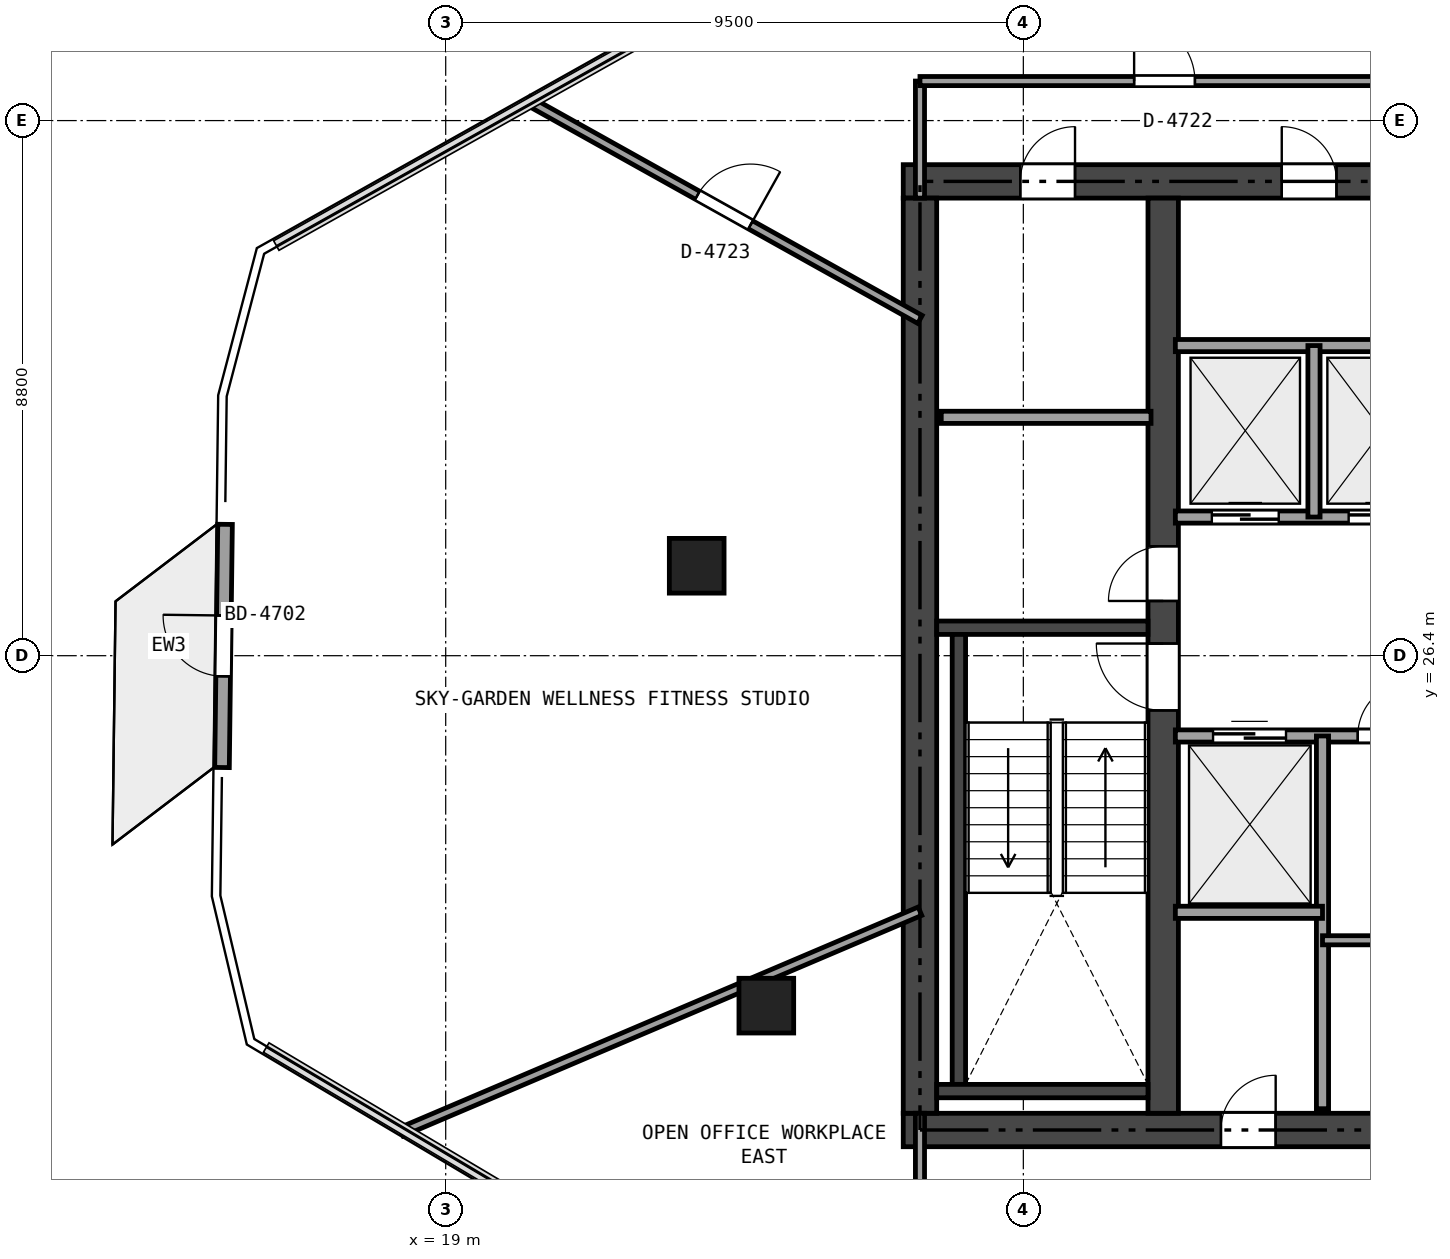
"""IFC4 building model, lengths in metres.
Left out: names, types, materials, properties, quantities, classifications, styles, units other than length and angle.
Written with IfcOpenShell. Run it as: python <this file> out.ifc"""

import sys

from ifc_helpers import new_model, si_unit, direction, frame, frame_2d, origin, origin_2d, place, context, subcontext, project, spatial, rectangle, extrude, element, fill, save


model = new_model("IFC4")
c1 = context("Model", 3, precision=1e-05, world=origin(), true_north=direction((0.0, 1.0)))
c2 = subcontext(c1, "Body", "Model", "MODEL_VIEW")
j1 = project(units=[si_unit("LENGTHUNIT", "METRE"), si_unit("PLANEANGLEUNIT", "RADIAN")], contexts=[c1])
p1 = place(None, origin())
s1 = spatial("IfcSite", under=j1, at=p1, CompositionType="ELEMENT")
p2 = place(p1, origin())
s2 = spatial("IfcBuilding", under=s1, at=p2, CompositionType="ELEMENT")
p3 = place(p2, frame((0.0, 0.0, 177.0)))
s3 = spatial("IfcBuildingStorey", under=s2, at=p3, CompositionType="ELEMENT", Elevation=177.0)
p4 = place(p3, frame((26.525, 18.6, 0.0), z_axis=(0.0, 0.0, 1.0), x_axis=(1.0, 0.0, 0.0)))
e1 = element("IfcWall", 1, at=p4, inside=s3, PredefinedType="SHEAR", context=c2, shape_type="SweptSolid", body=[
    extrude(rectangle(XDim=21.35, YDim=0.55, at=frame_2d((10.675, 0.0))), origin(), (0.0, 0.0, 1.0), 3.32),
])
p5 = place(p4, frame((12.4, 0.0, 0.0)))
e2 = element("IfcOpeningElement", 2, at=p5, cuts=e1, PredefinedType="OPENING", context=c2, shape_type="SweptSolid", body=[
    extrude(rectangle(XDim=1.15, YDim=2.15, at=frame_2d((0.575, 1.075))), frame((0.0, 0.285, 0.0), z_axis=(0.0, -1.0, 0.0), x_axis=(1.0, 0.0, 0.0)), (0.0, 0.0, 1.0), 0.57),
])
p6 = place(p4, frame((5.225, 0.0, 0.0)))
e3 = element("IfcOpeningElement", 3, at=p6, cuts=e1, PredefinedType="OPENING", context=c2, shape_type="SweptSolid", body=[
    extrude(rectangle(XDim=0.9, YDim=2.1, at=frame_2d((0.45, 1.05))), frame((0.0, 0.285, 0.0), z_axis=(0.0, -1.0, 0.0), x_axis=(1.0, 0.0, 0.0)), (0.0, 0.0, 1.0), 0.57),
])
p7 = place(p3, frame((26.525, 34.2, 0.0), z_axis=(0.0, 0.0, 1.0), x_axis=(1.0, 0.0, 0.0)))
e4 = element("IfcWall", 4, at=p7, inside=s3, PredefinedType="SHEAR", context=c2, shape_type="SweptSolid", body=[
    extrude(rectangle(XDim=21.35, YDim=0.55, at=frame_2d((10.675, 0.0))), origin(), (0.0, 0.0, 1.0), 3.32),
])
p8 = place(p7, frame((9.675, 0.0, 0.0)))
e5 = element("IfcOpeningElement", 5, at=p8, cuts=e4, PredefinedType="OPENING", context=c2, shape_type="SweptSolid", body=[
    extrude(rectangle(XDim=1.1, YDim=2.15, at=frame_2d((0.55, 1.075))), frame((0.0, 0.285, 0.0), z_axis=(0.0, -1.0, 0.0), x_axis=(1.0, 0.0, 0.0)), (0.0, 0.0, 1.0), 0.57),
])
p9 = place(p7, frame((1.925, 0.0, 0.0)))
e6 = element("IfcOpeningElement", 6, at=p9, cuts=e4, PredefinedType="OPENING", context=c2, shape_type="SweptSolid", body=[
    extrude(rectangle(XDim=0.9, YDim=2.1, at=frame_2d((0.45, 1.05))), frame((0.0, 0.285, 0.0), z_axis=(0.0, -1.0, 0.0), x_axis=(1.0, 0.0, 0.0)), (0.0, 0.0, 1.0), 0.57),
])
p10 = place(p7, frame((6.225, 0.0, 0.0)))
e7 = element("IfcOpeningElement", 7, at=p10, cuts=e4, PredefinedType="OPENING", context=c2, shape_type="SweptSolid", body=[
    extrude(rectangle(XDim=0.9, YDim=2.1, at=frame_2d((0.45, 1.05))), frame((0.0, 0.285, 0.0), z_axis=(0.0, -1.0, 0.0), x_axis=(1.0, 0.0, 0.0)), (0.0, 0.0, 1.0), 0.57),
])
p11 = place(p3, frame((26.8, 18.875, 0.0), z_axis=(0.0, 0.0, 1.0), x_axis=(0.0, 1.0, 0.0)))
e8 = element("IfcWall", 8, at=p11, inside=s3, PredefinedType="SHEAR", context=c2, shape_type="SweptSolid", body=[
    extrude(rectangle(XDim=15.05, YDim=0.55, at=frame_2d((7.525, 0.0))), origin(), (0.0, 0.0, 1.0), 3.32),
])
p12 = place(p3, frame((30.8, 18.875, 0.0), z_axis=(0.0, 0.0, 1.0), x_axis=(0.0, 1.0, 0.0)))
e9 = element("IfcWall", 9, at=p12, inside=s3, PredefinedType="SHEAR", context=c2, shape_type="SweptSolid", body=[
    extrude(rectangle(XDim=15.05, YDim=0.5, at=frame_2d((7.525, 0.0))), origin(), (0.0, 0.0, 1.0), 3.32),
])
p13 = place(p12, frame((6.625, 0.0, 0.0)))
e10 = element("IfcOpeningElement", 10, at=p13, cuts=e9, PredefinedType="OPENING", context=c2, shape_type="SweptSolid", body=[
    extrude(rectangle(XDim=1.1, YDim=2.15, at=frame_2d((0.55, 1.075))), frame((0.0, 0.26, 0.0), z_axis=(0.0, -1.0, 0.0), x_axis=(1.0, 0.0, 0.0)), (0.0, 0.0, 1.0), 0.52),
])
p14 = place(p12, frame((8.425, 0.0, 0.0)))
e11 = element("IfcOpeningElement", 11, at=p14, cuts=e9, PredefinedType="OPENING", context=c2, shape_type="SweptSolid", body=[
    extrude(rectangle(XDim=0.9, YDim=2.1, at=frame_2d((0.45, 1.05))), frame((0.0, 0.26, 0.0), z_axis=(0.0, -1.0, 0.0), x_axis=(1.0, 0.0, 0.0)), (0.0, 0.0, 1.0), 0.52),
])
p15 = place(p3, frame((27.075, 26.86, 0.0), z_axis=(0.0, 0.0, 1.0), x_axis=(1.0, 0.0, 0.0)))
e12 = element("IfcWall", 12, at=p15, inside=s3, PredefinedType="SHEAR", context=c2, shape_type="SweptSolid", body=[
    extrude(rectangle(XDim=3.475, YDim=0.22, at=frame_2d((1.738, 0.0))), origin(), (0.0, 0.0, 1.0), 3.32),
])
p16 = place(p3, frame((27.44, 19.35, 0.0), z_axis=(0.0, 0.0, 1.0), x_axis=(0.0, 1.0, 0.0)))
e13 = element("IfcWall", 13, at=p16, inside=s3, PredefinedType="SHEAR", context=c2, shape_type="SweptSolid", body=[
    extrude(rectangle(XDim=7.4, YDim=0.22, at=frame_2d((3.7, 0.0))), origin(), (0.0, 0.0, 1.0), 3.32),
])
p17 = place(p3, frame((27.075, 19.24, 0.0), z_axis=(0.0, 0.0, 1.0), x_axis=(1.0, 0.0, 0.0)))
e14 = element("IfcWall", 14, at=p17, inside=s3, PredefinedType="SHEAR", context=c2, shape_type="SweptSolid", body=[
    extrude(rectangle(XDim=3.475, YDim=0.22, at=frame_2d((1.738, 0.0))), origin(), (0.0, 0.0, 1.0), 3.32),
])
for number, where, z_axis, x_axis in (
    (15, (23.128, 27.879, -0.405), (0.0, 0.0, 1.0), (1.0, 0.0, 0.0)),
    (16, (24.273, 20.645, -0.405), (0.0, 0.0, 1.0), (1.0, 0.0, 0.0)),
):
    element("IfcColumn", number, at=place(p3, frame(where, z_axis=z_axis, x_axis=x_axis)), inside=s3, PredefinedType="COLUMN", context=c2, shape_type="SweptSolid", body=[
        extrude(rectangle(XDim=0.9, YDim=0.9, at=origin_2d()), origin(), (0.0, 0.0, 1.0), 3.725),
    ])
p18 = place(p3, frame((15.321, 24.561, 0.0), z_axis=(0.0, 0.0, 1.0), x_axis=(0.012514282486, 0.999921693301, 0.0)))
e17 = element("IfcWall", 17, at=p18, inside=s3, PredefinedType="SOLIDWALL", context=c2, shape_type="SweptSolid", body=[
    extrude(rectangle(XDim=3.999, YDim=0.24, at=frame_2d((2.0, 0.0))), origin(), (0.0, 0.0, 1.0), 3.32),
])
p19 = place(p18, frame((1.5, 0.0, 0.0)))
e18 = element("IfcOpeningElement", 18, at=p19, cuts=e17, PredefinedType="OPENING", context=c2, shape_type="SweptSolid", body=[
    extrude(rectangle(XDim=1.0, YDim=2.15, at=frame_2d((0.5, 1.075))), frame((0.0, 0.13, 0.0), z_axis=(0.0, -1.0, 0.0), x_axis=(1.0, 0.0, 0.0)), (0.0, 0.0, 1.0), 0.26),
])
p20 = place(p3, frame((27.15, 30.32, 0.0), z_axis=(0.0, 0.0, 1.0), x_axis=(1.0, 0.0, 0.0)))
e19 = element("IfcWall", 19, at=p20, inside=s3, PredefinedType="SOLIDWALL", context=c2, shape_type="SweptSolid", body=[
    extrude(rectangle(XDim=3.45, YDim=0.2, at=frame_2d((1.725, 0.0))), origin(), (0.0, 0.0, 1.0), 3.32),
])
p21 = place(p3, frame((31.0, 28.68, 0.0), z_axis=(0.0, 0.0, 1.0), x_axis=(1.0, 0.0, 0.0)))
e20 = element("IfcWall", 20, at=p21, inside=s3, PredefinedType="SOLIDWALL", context=c2, shape_type="SweptSolid", body=[
    extrude(rectangle(XDim=4.42, YDim=0.2, at=frame_2d((2.21, 0.0))), origin(), (0.0, 0.0, 1.0), 3.32),
])
p22 = place(p21, frame((0.6, 0.0, 0.0)))
e21 = element("IfcOpeningElement", 21, at=p22, cuts=e20, PredefinedType="OPENING", context=c2, shape_type="SweptSolid", body=[
    extrude(rectangle(XDim=1.1, YDim=2.15, at=frame_2d((0.55, 1.075))), frame((0.0, 0.11, 0.0), z_axis=(0.0, -1.0, 0.0), x_axis=(1.0, 0.0, 0.0)), (0.0, 0.0, 1.0), 0.22),
])
p23 = place(p21, frame((2.85, 0.0, 0.0)))
e22 = element("IfcOpeningElement", 22, at=p23, cuts=e20, PredefinedType="OPENING", context=c2, shape_type="SweptSolid", body=[
    extrude(rectangle(XDim=1.1, YDim=2.15, at=frame_2d((0.55, 1.075))), frame((0.0, 0.11, 0.0), z_axis=(0.0, -1.0, 0.0), x_axis=(1.0, 0.0, 0.0)), (0.0, 0.0, 1.0), 0.22),
])
p24 = place(p3, frame((31.0, 31.5, 0.0), z_axis=(0.0, 0.0, 1.0), x_axis=(1.0, 0.0, 0.0)))
e23 = element("IfcWall", 23, at=p24, inside=s3, PredefinedType="SOLIDWALL", context=c2, shape_type="SweptSolid", body=[
    extrude(rectangle(XDim=4.42, YDim=0.2, at=frame_2d((2.21, 0.0))), origin(), (0.0, 0.0, 1.0), 3.32),
])
p25 = place(p3, frame((33.28, 28.68, 0.0), z_axis=(0.0, 0.0, 1.0), x_axis=(0.0, 1.0, 0.0)))
e24 = element("IfcWall", 24, at=p25, inside=s3, PredefinedType="SOLIDWALL", context=c2, shape_type="SweptSolid", body=[
    extrude(rectangle(XDim=2.82, YDim=0.2, at=frame_2d((1.41, 0.0))), origin(), (0.0, 0.0, 1.0), 3.32),
])
p26 = place(p3, frame((31.0, 25.08, 0.0), z_axis=(0.0, 0.0, 1.0), x_axis=(1.0, 0.0, 0.0)))
e25 = element("IfcWall", 25, at=p26, inside=s3, PredefinedType="SOLIDWALL", context=c2, shape_type="SweptSolid", body=[
    extrude(rectangle(XDim=4.42, YDim=0.2, at=frame_2d((2.21, 0.0))), origin(), (0.0, 0.0, 1.0), 3.32),
])
p27 = place(p26, frame((3.0, 0.0, 0.0)))
e26 = element("IfcOpeningElement", 26, at=p27, cuts=e25, PredefinedType="OPENING", context=c2, shape_type="SweptSolid", body=[
    extrude(rectangle(XDim=0.9, YDim=2.1, at=frame_2d((0.45, 1.05))), frame((0.0, 0.11, 0.0), z_axis=(0.0, -1.0, 0.0), x_axis=(1.0, 0.0, 0.0)), (0.0, 0.0, 1.0), 0.22),
])
p28 = place(p26, frame((0.62, 0.0, 0.0)))
e27 = element("IfcOpeningElement", 27, at=p28, cuts=e25, PredefinedType="OPENING", context=c2, shape_type="SweptSolid", body=[
    extrude(rectangle(XDim=1.2, YDim=2.15, at=frame_2d((0.6, 1.075))), frame((0.0, 0.11, 0.0), z_axis=(0.0, -1.0, 0.0), x_axis=(1.0, 0.0, 0.0)), (0.0, 0.0, 1.0), 0.22),
])
p29 = place(p3, frame((33.42, 18.95, 0.0), z_axis=(0.0, 0.0, 1.0), x_axis=(0.0, 1.0, 0.0)))
e28 = element("IfcWall", 28, at=p29, inside=s3, PredefinedType="SOLIDWALL", context=c2, shape_type="SweptSolid", body=[
    extrude(rectangle(XDim=6.13, YDim=0.2, at=frame_2d((3.065, 0.0))), origin(), (0.0, 0.0, 1.0), 2.841),
])
p30 = place(p3, frame((31.0, 22.18, 0.0), z_axis=(0.0, 0.0, 1.0), x_axis=(1.0, 0.0, 0.0)))
e29 = element("IfcWall", 29, at=p30, inside=s3, PredefinedType="SOLIDWALL", context=c2, shape_type="SweptSolid", body=[
    extrude(rectangle(XDim=2.42, YDim=0.2, at=frame_2d((1.21, 0.0))), origin(), (0.0, 0.0, 1.0), 3.32),
])
p31 = place(p3, frame((33.42, 21.72, 0.0), z_axis=(0.0, 0.0, 1.0), x_axis=(1.0, 0.0, 0.0)))
e30 = element("IfcWall", 30, at=p31, inside=s3, PredefinedType="PARTITIONING", context=c2, shape_type="SweptSolid", body=[
    extrude(rectangle(XDim=2.0, YDim=0.15, at=frame_2d((1.0, 0.0))), origin(), (0.0, 0.0, 1.0), 3.32),
])
p32 = place(p3, frame((33.074, 42.648, 0.0), z_axis=(0.0, 0.0, 1.0), x_axis=(0.251977614861, -0.967733063199, 0.0)))
e31 = element("IfcWall", 31, at=p32, inside=s3, PredefinedType="PARTITIONING", context=c2, shape_type="SweptSolid", body=[
    extrude(rectangle(XDim=7.024, YDim=0.15, at=frame_2d((3.512, 0.0))), origin(), (0.0, 0.0, 1.0), 2.905),
])
p33 = place(p3, frame((20.355, 35.527, 0.0), z_axis=(0.0, 0.0, 1.0), x_axis=(0.87320228503, -0.487357947938, 0.0)))
e32 = element("IfcWall", 32, at=p33, inside=s3, PredefinedType="PARTITIONING", context=c2, shape_type="SweptSolid", body=[
    extrude(rectangle(XDim=7.381, YDim=0.15, at=frame_2d((3.69, 0.0))), origin(), (0.0, 0.0, 1.0), 2.905),
])
p34 = place(p33, frame((3.19, 0.0, 0.0)))
e33 = element("IfcOpeningElement", 33, at=p34, cuts=e32, PredefinedType="OPENING", context=c2, shape_type="SweptSolid", body=[
    extrude(rectangle(XDim=1.0, YDim=2.15, at=frame_2d((0.5, 1.075))), frame((0.0, 0.085, 0.0), z_axis=(0.0, -1.0, 0.0), x_axis=(1.0, 0.0, 0.0)), (0.0, 0.0, 1.0), 0.17),
])
p35 = place(p3, frame((26.8, 33.925, 0.0), z_axis=(0.0, 0.0, 1.0), x_axis=(0.0, 1.0, 0.0)))
e34 = element("IfcWall", 34, at=p35, inside=s3, PredefinedType="PARTITIONING", context=c2, shape_type="SweptSolid", body=[
    extrude(rectangle(XDim=1.925, YDim=0.15, at=frame_2d((0.962, 0.0))), origin(), (0.0, 0.0, 1.0), 2.905),
])
p36 = place(p3, frame((26.8, 35.85, 0.0), z_axis=(0.0, 0.0, 1.0), x_axis=(1.0, 0.0, 0.0)))
e35 = element("IfcWall", 35, at=p36, inside=s3, PredefinedType="PARTITIONING", context=c2, shape_type="SweptSolid", body=[
    extrude(rectangle(XDim=8.044, YDim=0.15, at=frame_2d((4.022, 0.0))), origin(), (0.0, 0.0, 1.0), 2.697),
])
p37 = place(p36, frame((3.522, 0.0, 0.0)))
e36 = element("IfcOpeningElement", 36, at=p37, cuts=e35, PredefinedType="OPENING", context=c2, shape_type="SweptSolid", body=[
    extrude(rectangle(XDim=1.0, YDim=2.15, at=frame_2d((0.5, 1.075))), frame((0.0, 0.085, 0.0), z_axis=(0.0, -1.0, 0.0), x_axis=(1.0, 0.0, 0.0)), (0.0, 0.0, 1.0), 0.17),
])
p38 = place(p3, frame((18.271, 18.57, 0.0), z_axis=(0.0, 0.0, 1.0), x_axis=(0.92021116407, 0.391422295637, 0.0)))
e37 = element("IfcWall", 37, at=p38, inside=s3, PredefinedType="PARTITIONING", context=c2, shape_type="SweptSolid", body=[
    extrude(rectangle(XDim=9.269, YDim=0.15, at=frame_2d((4.634, 0.0))), origin(), (0.0, 0.0, 1.0), 2.905),
])
p39 = place(p3, frame((26.8, 16.95, 0.0), z_axis=(0.0, 0.0, 1.0), x_axis=(0.0, 1.0, 0.0)))
e38 = element("IfcWall", 38, at=p39, inside=s3, PredefinedType="PARTITIONING", context=c2, shape_type="SweptSolid", body=[
    extrude(rectangle(XDim=1.925, YDim=0.15, at=frame_2d((0.962, 0.0))), origin(), (0.0, 0.0, 1.0), 2.905),
])
p40 = place(p19, origin())
e39 = element("IfcDoor", 39, at=p40, inside=s3, OperationType="SINGLE_SWING_RIGHT", PredefinedType="DOOR", context=c2, shape_type="SweptSolid", body=[
    extrude(rectangle(XDim=1.0, YDim=2.15, at=frame_2d((0.5, 1.075))), frame((0.0, 0.025, 0.0), z_axis=(0.0, -1.0, 0.0), x_axis=(1.0, 0.0, 0.0)), (0.0, 0.0, 1.0), 0.05),
])
fill(e18, e39)
p41 = place(p13, origin())
e40 = element("IfcDoor", 40, at=p41, inside=s3, OperationType="SINGLE_SWING_RIGHT", PredefinedType="DOOR", context=c2, shape_type="SweptSolid", body=[
    extrude(rectangle(XDim=1.1, YDim=2.15, at=frame_2d((0.55, 1.075))), frame((0.0, 0.025, 0.0), z_axis=(0.0, -1.0, 0.0), x_axis=(1.0, 0.0, 0.0)), (0.0, 0.0, 1.0), 0.05),
])
fill(e10, e40)
p42 = place(p14, origin())
e41 = element("IfcDoor", 41, at=p42, inside=s3, OperationType="SINGLE_SWING_LEFT", PredefinedType="DOOR", context=c2, shape_type="SweptSolid", body=[
    extrude(rectangle(XDim=0.9, YDim=2.1, at=frame_2d((0.45, 1.05))), frame((0.0, 0.025, 0.0), z_axis=(0.0, -1.0, 0.0), x_axis=(1.0, 0.0, 0.0)), (0.0, 0.0, 1.0), 0.05),
])
fill(e11, e41)
p43 = place(p9, origin())
e42 = element("IfcDoor", 42, at=p43, inside=s3, OperationType="SINGLE_SWING_RIGHT", PredefinedType="DOOR", context=c2, shape_type="SweptSolid", body=[
    extrude(rectangle(XDim=0.9, YDim=2.1, at=frame_2d((0.45, 1.05))), frame((0.0, 0.025, 0.0), z_axis=(0.0, -1.0, 0.0), x_axis=(1.0, 0.0, 0.0)), (0.0, 0.0, 1.0), 0.05),
])
fill(e6, e42)
p44 = place(p10, origin())
e43 = element("IfcDoor", 43, at=p44, inside=s3, OperationType="SINGLE_SWING_LEFT", PredefinedType="DOOR", context=c2, shape_type="SweptSolid", body=[
    extrude(rectangle(XDim=0.9, YDim=2.1, at=frame_2d((0.45, 1.05))), frame((0.0, 0.025, 0.0), z_axis=(0.0, -1.0, 0.0), x_axis=(1.0, 0.0, 0.0)), (0.0, 0.0, 1.0), 0.05),
])
fill(e7, e43)
p45 = place(p6, origin())
e44 = element("IfcDoor", 44, at=p45, inside=s3, OperationType="SINGLE_SWING_RIGHT", PredefinedType="DOOR", context=c2, shape_type="SweptSolid", body=[
    extrude(rectangle(XDim=0.9, YDim=2.1, at=frame_2d((0.45, 1.05))), frame((0.0, 0.025, 0.0), z_axis=(0.0, -1.0, 0.0), x_axis=(1.0, 0.0, 0.0)), (0.0, 0.0, 1.0), 0.05),
])
fill(e3, e44)
p46 = place(p27, origin())
e45 = element("IfcDoor", 45, at=p46, inside=s3, OperationType="SINGLE_SWING_RIGHT", PredefinedType="DOOR", context=c2, shape_type="SweptSolid", body=[
    extrude(rectangle(XDim=0.9, YDim=2.1, at=frame_2d((0.45, 1.05))), frame((0.0, 0.025, 0.0), z_axis=(0.0, -1.0, 0.0), x_axis=(1.0, 0.0, 0.0)), (0.0, 0.0, 1.0), 0.05),
])
fill(e26, e45)
p47 = place(p22, origin())
e46 = element("IfcDoor", 46, at=p47, inside=s3, OperationType="SLIDING_TO_LEFT", PredefinedType="DOOR", context=c2, shape_type="SweptSolid", body=[
    extrude(rectangle(XDim=1.1, YDim=2.15, at=frame_2d((0.55, 1.075))), frame((0.0, 0.025, 0.0), z_axis=(0.0, -1.0, 0.0), x_axis=(1.0, 0.0, 0.0)), (0.0, 0.0, 1.0), 0.05),
])
fill(e21, e46)
p48 = place(p23, origin())
e47 = element("IfcDoor", 47, at=p48, inside=s3, OperationType="SLIDING_TO_LEFT", PredefinedType="DOOR", context=c2, shape_type="SweptSolid", body=[
    extrude(rectangle(XDim=1.1, YDim=2.15, at=frame_2d((0.55, 1.075))), frame((0.0, 0.025, 0.0), z_axis=(0.0, -1.0, 0.0), x_axis=(1.0, 0.0, 0.0)), (0.0, 0.0, 1.0), 0.05),
])
fill(e22, e47)
p49 = place(p28, origin())
e48 = element("IfcDoor", 48, at=p49, inside=s3, OperationType="SLIDING_TO_LEFT", PredefinedType="DOOR", context=c2, shape_type="SweptSolid", body=[
    extrude(rectangle(XDim=1.2, YDim=2.15, at=frame_2d((0.6, 1.075))), frame((0.0, 0.025, 0.0), z_axis=(0.0, -1.0, 0.0), x_axis=(1.0, 0.0, 0.0)), (0.0, 0.0, 1.0), 0.05),
])
fill(e27, e48)
p50 = place(p37, origin())
e49 = element("IfcDoor", 49, at=p50, inside=s3, OperationType="SINGLE_SWING_LEFT", PredefinedType="DOOR", context=c2, shape_type="SweptSolid", body=[
    extrude(rectangle(XDim=1.0, YDim=2.15, at=frame_2d((0.5, 1.075))), frame((0.0, 0.025, 0.0), z_axis=(0.0, -1.0, 0.0), x_axis=(1.0, 0.0, 0.0)), (0.0, 0.0, 1.0), 0.05),
])
fill(e36, e49)
p51 = place(p34, origin())
e50 = element("IfcDoor", 50, at=p51, inside=s3, OperationType="SINGLE_SWING_RIGHT", PredefinedType="DOOR", context=c2, shape_type="SweptSolid", body=[
    extrude(rectangle(XDim=1.0, YDim=2.15, at=frame_2d((0.5, 1.075))), frame((0.0, 0.025, 0.0), z_axis=(0.0, -1.0, 0.0), x_axis=(1.0, 0.0, 0.0)), (0.0, 0.0, 1.0), 0.05),
])
fill(e33, e50)
save(model, sys.argv[1])
